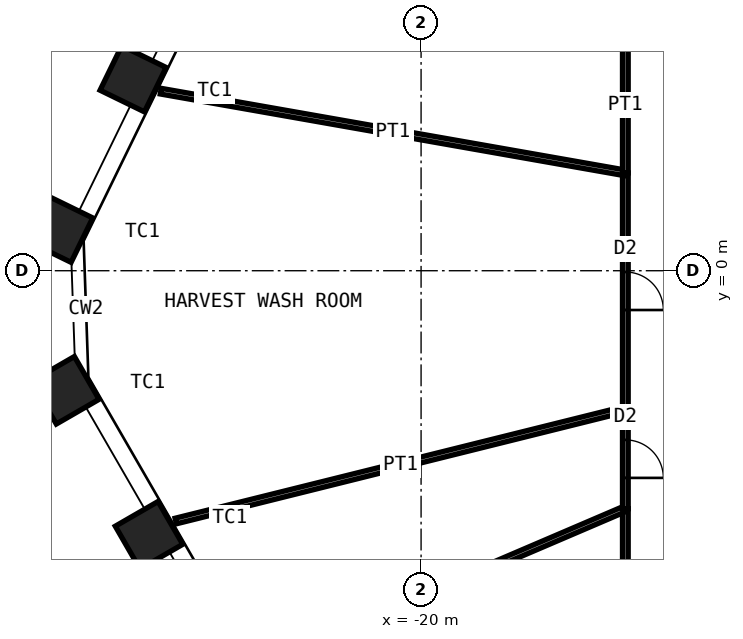
"""IFC4 building model, lengths in metres.
Left out: names, types, materials, properties, quantities, classifications, styles, units other than length and angle.
Written with IfcOpenShell. Run it as: python <this file> out.ifc"""

import sys

from ifc_helpers import new_model, si_unit, direction, frame, frame_2d, origin, origin_2d, place, context, subcontext, project, spatial, rectangle, hollow_rectangle, extrude, element, fill, save


model = new_model("IFC4")
c1 = context("Model", 3, precision=1e-05, world=origin(), true_north=direction((0.0, 1.0)))
c2 = subcontext(c1, "Body", "Model", "MODEL_VIEW")
j1 = project(units=[si_unit("LENGTHUNIT", "METRE"), si_unit("PLANEANGLEUNIT", "RADIAN")], contexts=[c1])
p1 = place(None, origin())
s1 = spatial("IfcSite", under=j1, at=p1, CompositionType="ELEMENT")
p2 = place(p1, origin())
s2 = spatial("IfcBuilding", under=s1, at=p2, CompositionType="ELEMENT")
p3 = place(p2, frame((0.0, 0.0, 47.0)))
s3 = spatial("IfcBuildingStorey", under=s2, at=p3, CompositionType="ELEMENT", Elevation=47.0)
for number, where, z_axis, x_axis in (
    (1, (-27.158, -6.96, 0.0), (0.0, 0.0, 1.0), (0.5, -0.866, 0.0)),
    (2, (-29.361, -3.146, 0.0), (0.0, 0.0, 1.0), (0.5, -0.866, 0.0)),
    (3, (-29.509, 1.09, 0.0), (0.0, 0.0, 1.0), (-0.438, -0.899, 0.0)),
    (4, (-27.578, 5.049, 0.0), (0.0, 0.0, 1.0), (-0.438, -0.899, 0.0)),
):
    element("IfcColumn", number, at=place(p3, frame(where, z_axis=z_axis, x_axis=x_axis)), inside=s3, PredefinedType="COLUMN", context=c2, shape_type="SweptSolid", body=[
        extrude(hollow_rectangle(XDim=1.3, YDim=1.3, WallThickness=0.1, at=origin_2d()), origin(), (0.0, 0.0, 1.0), 5.0),
    ])
p4 = place(p3, frame((-14.625, -11.625, 0.0), z_axis=(0.0, 0.0, 1.0), x_axis=(0.0, 1.0, 0.0)))
e5 = element("IfcWall", 5, at=p4, inside=s3, PredefinedType="PARTITIONING", context=c2, shape_type="SweptSolid", body=[
    extrude(rectangle(XDim=5.364, YDim=0.15, at=frame_2d((2.682, 0.0))), origin(), (0.0, 0.0, 1.0), 4.8),
])
p5 = place(p3, frame((-24.258, -10.385, 0.0), z_axis=(0.0, 0.0, 1.0), x_axis=(0.919298009201, 0.393562155547, 0.0)))
e6 = element("IfcWall", 6, at=p5, inside=s3, PredefinedType="PARTITIONING", context=c2, shape_type="SweptSolid", body=[
    extrude(rectangle(XDim=10.479, YDim=0.15, at=frame_2d((5.239, 0.0))), origin(), (0.0, 0.0, 1.0), 3.7),
])
p6 = place(p3, frame((-14.625, -6.261, 0.0), z_axis=(0.0, 0.0, 1.0), x_axis=(0.0, 1.0, 0.0)))
e7 = element("IfcWall", 7, at=p6, inside=s3, PredefinedType="PARTITIONING", context=c2, shape_type="SweptSolid", body=[
    extrude(rectangle(XDim=2.62, YDim=0.15, at=frame_2d((1.31, 0.0))), origin(), (0.0, 0.0, 1.0), 4.8),
])
p7 = place(p6, frame((0.81, 0.0, 0.0)))
e8 = element("IfcOpeningElement", 8, at=p7, cuts=e7, PredefinedType="OPENING", context=c2, shape_type="SweptSolid", body=[
    extrude(rectangle(XDim=1.0, YDim=2.4, at=frame_2d((0.5, 1.2))), frame((0.0, 0.085, 0.0), z_axis=(0.0, -1.0, 0.0), x_axis=(1.0, 0.0, 0.0)), (0.0, 0.0, 1.0), 0.17),
])
p8 = place(p3, frame((-26.455, -6.586, 0.0), z_axis=(0.0, 0.0, 1.0), x_axis=(0.970383505188, 0.241569561118, 0.0)))
e9 = element("IfcWall", 9, at=p8, inside=s3, PredefinedType="PARTITIONING", context=c2, shape_type="SweptSolid", body=[
    extrude(rectangle(XDim=12.191, YDim=0.15, at=frame_2d((6.096, 0.0))), origin(), (0.0, 0.0, 1.0), 3.7),
])
p9 = place(p3, frame((-14.625, -3.641, 0.0), z_axis=(0.0, 0.0, 1.0), x_axis=(0.0, 1.0, 0.0)))
e10 = element("IfcWall", 10, at=p9, inside=s3, PredefinedType="PARTITIONING", context=c2, shape_type="SweptSolid", body=[
    extrude(rectangle(XDim=6.214, YDim=0.15, at=frame_2d((3.107, 0.0))), origin(), (0.0, 0.0, 1.0), 4.8),
])
p10 = place(p9, frame((2.607, 0.0, 0.0)))
e11 = element("IfcOpeningElement", 11, at=p10, cuts=e10, PredefinedType="OPENING", context=c2, shape_type="SweptSolid", body=[
    extrude(rectangle(XDim=1.0, YDim=2.4, at=frame_2d((0.5, 1.2))), frame((0.0, 0.085, 0.0), z_axis=(0.0, -1.0, 0.0), x_axis=(1.0, 0.0, 0.0)), (0.0, 0.0, 1.0), 0.17),
])
p11 = place(p3, frame((-26.85, 4.725, 0.0), z_axis=(0.0, 0.0, 1.0), x_axis=(0.984869569104, -0.173297235559, 0.0)))
e12 = element("IfcWall", 12, at=p11, inside=s3, PredefinedType="PARTITIONING", context=c2, shape_type="SweptSolid", body=[
    extrude(rectangle(XDim=12.413, YDim=0.15, at=frame_2d((6.207, 0.0))), origin(), (0.0, 0.0, 1.0), 3.7),
])
p12 = place(p3, frame((-14.625, 2.573, 0.0), z_axis=(0.0, 0.0, 1.0), x_axis=(0.0, 1.0, 0.0)))
e13 = element("IfcWall", 13, at=p12, inside=s3, PredefinedType="PARTITIONING", context=c2, shape_type="SweptSolid", body=[
    extrude(rectangle(XDim=8.915, YDim=0.15, at=frame_2d((4.457, 0.0))), origin(), (0.0, 0.0, 1.0), 4.8),
])
p13 = place(p12, frame((3.557, 0.0, 0.0)))
e14 = element("IfcOpeningElement", 14, at=p13, cuts=e13, PredefinedType="OPENING", context=c2, shape_type="SweptSolid", body=[
    extrude(rectangle(XDim=1.8, YDim=2.4, at=frame_2d((0.9, 1.2))), frame((0.0, 0.085, 0.0), z_axis=(0.0, -1.0, 0.0), x_axis=(1.0, 0.0, 0.0)), (0.0, 0.0, 1.0), 0.17),
])
p14 = place(p7, origin())
e15 = element("IfcDoor", 15, at=p14, inside=s3, OperationType="SINGLE_SWING_LEFT", PredefinedType="DOOR", context=c2, shape_type="SweptSolid", body=[
    extrude(rectangle(XDim=1.0, YDim=2.4, at=frame_2d((0.5, 1.2))), frame((0.0, 0.025, 0.0), z_axis=(0.0, -1.0, 0.0), x_axis=(1.0, 0.0, 0.0)), (0.0, 0.0, 1.0), 0.05),
])
fill(e8, e15)
p15 = place(p10, origin())
e16 = element("IfcDoor", 16, at=p15, inside=s3, OperationType="SINGLE_SWING_LEFT", PredefinedType="DOOR", context=c2, shape_type="SweptSolid", body=[
    extrude(rectangle(XDim=1.0, YDim=2.4, at=frame_2d((0.5, 1.2))), frame((0.0, 0.025, 0.0), z_axis=(0.0, -1.0, 0.0), x_axis=(1.0, 0.0, 0.0)), (0.0, 0.0, 1.0), 0.05),
])
fill(e11, e16)
save(model, sys.argv[1])
